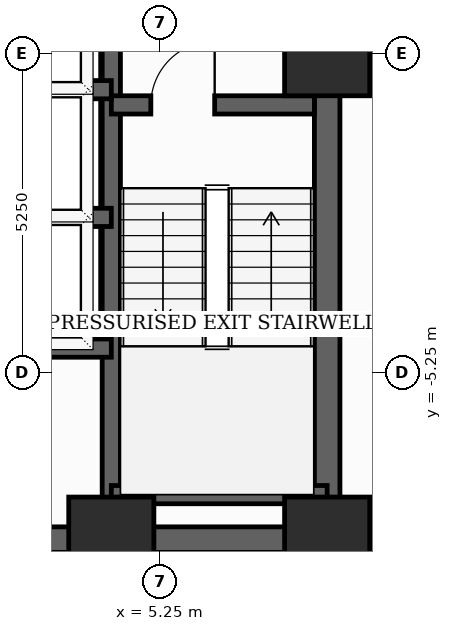
"""IFC4 building model, lengths in metres.
Left out: names, types, materials, properties, quantities, classifications, styles, units other than length and angle.
Written with IfcOpenShell. Run it as: python <this file> out.ifc"""

import sys

from ifc_helpers import new_model, si_unit, direction, frame, frame_2d, origin, origin_2d, place, context, subcontext, project, spatial, rectangle, extrude, element, fill, save


model = new_model("IFC4")
c1 = context("Model", 3, precision=1e-05, world=origin(), true_north=direction((0.0, 1.0)))
c2 = subcontext(c1, "Body", "Model", "MODEL_VIEW")
j1 = project(units=[si_unit("LENGTHUNIT", "METRE"), si_unit("PLANEANGLEUNIT", "RADIAN")], contexts=[c1])
p1 = place(None, origin())
s1 = spatial("IfcSite", under=j1, at=p1, CompositionType="ELEMENT")
p2 = place(p1, origin())
s2 = spatial("IfcBuilding", under=s1, at=p2, CompositionType="ELEMENT")
p3 = place(p2, frame((0.0, 0.0, 131.0)))
s3 = spatial("IfcBuildingStorey", under=s2, at=p3, CompositionType="ELEMENT", Elevation=131.0)
for number, where, z_axis, x_axis in (
    (1, (4.45, -8.0, 0.0), (0.0, 0.0, 1.0), (1.0, 0.0, 0.0)),
    (2, (8.0, -8.0, 0.0), (0.0, 0.0, 1.0), (1.0, 0.0, 0.0)),
    (3, (8.0, 0.0, 0.0), (0.0, 0.0, 1.0), (1.0, 0.0, 0.0)),
):
    element("IfcColumn", number, at=place(p3, frame(where, z_axis=z_axis, x_axis=x_axis)), inside=s3, PredefinedType="COLUMN", context=c2, shape_type="SweptSolid", body=[
        extrude(rectangle(XDim=1.4, YDim=1.4, at=origin_2d()), origin(), (0.0, 0.0, 1.0), 3.7),
    ])
p4 = place(p3, frame((8.0, -8.0, 0.0), z_axis=(0.0, 0.0, 1.0), x_axis=(0.0, 1.0, 0.0)))
e4 = element("IfcWall", 4, at=p4, inside=s3, PredefinedType="SHEAR", context=c2, shape_type="SweptSolid", body=[
    extrude(rectangle(XDim=16.0, YDim=0.42, at=frame_2d((8.0, 0.0))), origin(), (0.0, 0.0, 1.0), 3.5),
])
p5 = place(p4, frame((9.6, 0.0, 0.0)))
e5 = element("IfcOpeningElement", 5, at=p5, cuts=e4, PredefinedType="OPENING", context=c2, shape_type="SweptSolid", body=[
    extrude(rectangle(XDim=1.05, YDim=2.15, at=frame_2d((0.525, 1.075))), frame((0.0, 0.22, 0.0), z_axis=(0.0, -1.0, 0.0), x_axis=(1.0, 0.0, 0.0)), (0.0, 0.0, 1.0), 0.44),
])
p6 = place(p4, frame((14.229, 0.0, 0.0)))
e6 = element("IfcOpeningElement", 6, at=p6, cuts=e4, PredefinedType="OPENING", context=c2, shape_type="SweptSolid", body=[
    extrude(rectangle(XDim=0.85, YDim=2.02, at=frame_2d((0.425, 1.01))), frame((0.0, 0.22, 0.0), z_axis=(0.0, -1.0, 0.0), x_axis=(1.0, 0.0, 0.0)), (0.0, 0.0, 1.0), 0.44),
])
p7 = place(p3, frame((-8.0, -8.0, 0.0), z_axis=(0.0, 0.0, 1.0), x_axis=(1.0, 0.0, 0.0)))
e7 = element("IfcWall", 7, at=p7, inside=s3, PredefinedType="SHEAR", context=c2, shape_type="SweptSolid", body=[
    extrude(rectangle(XDim=16.0, YDim=0.42, at=frame_2d((8.0, 0.0))), origin(), (0.0, 0.0, 1.0), 3.5),
])
p8 = place(p7, frame((5.2, 0.0, 0.0)))
e8 = element("IfcOpeningElement", 8, at=p8, cuts=e7, PredefinedType="OPENING", context=c2, shape_type="SweptSolid", body=[
    extrude(rectangle(XDim=0.95, YDim=2.1, at=frame_2d((0.475, 1.05))), frame((0.0, 0.22, 0.0), z_axis=(0.0, -1.0, 0.0), x_axis=(1.0, 0.0, 0.0)), (0.0, 0.0, 1.0), 0.44),
])
p9 = place(p7, frame((9.8, 0.0, 0.0)))
e9 = element("IfcOpeningElement", 9, at=p9, cuts=e7, PredefinedType="OPENING", context=c2, shape_type="SweptSolid", body=[
    extrude(rectangle(XDim=0.95, YDim=2.1, at=frame_2d((0.475, 1.05))), frame((0.0, 0.22, 0.0), z_axis=(0.0, -1.0, 0.0), x_axis=(1.0, 0.0, 0.0)), (0.0, 0.0, 1.0), 0.44),
])
p10 = place(p3, frame((4.45, -7.79, 0.0), z_axis=(0.0, 0.0, 1.0), x_axis=(0.0, 1.0, 0.0)))
e10 = element("IfcWall", 10, at=p10, inside=s3, PredefinedType="SHEAR", context=c2, shape_type="SweptSolid", body=[
    extrude(rectangle(XDim=15.58, YDim=0.3, at=frame_2d((7.79, 0.0))), origin(), (0.0, 0.0, 1.0), 3.5),
])
p11 = place(p3, frame((4.45, -0.85, 0.0), z_axis=(0.0, 0.0, 1.0), x_axis=(1.0, 0.0, 0.0)))
e11 = element("IfcWall", 11, at=p11, inside=s3, PredefinedType="SHEAR", context=c2, shape_type="SweptSolid", body=[
    extrude(rectangle(XDim=3.34, YDim=0.3, at=frame_2d((1.67, 0.0))), origin(), (0.0, 0.0, 1.0), 3.5),
])
p12 = place(p11, frame((0.65, 0.0, 0.0)))
e12 = element("IfcOpeningElement", 12, at=p12, cuts=e11, PredefinedType="OPENING", context=c2, shape_type="SweptSolid", body=[
    extrude(rectangle(XDim=1.05, YDim=2.15, at=frame_2d((0.525, 1.075))), frame((0.0, 0.16, 0.0), z_axis=(0.0, -1.0, 0.0), x_axis=(1.0, 0.0, 0.0)), (0.0, 0.0, 1.0), 0.32),
])
p13 = place(p3, frame((4.45, -7.26, 0.0), z_axis=(0.0, 0.0, 1.0), x_axis=(1.0, 0.0, 0.0)))
e13 = element("IfcWall", 13, at=p13, inside=s3, PredefinedType="SHEAR", context=c2, shape_type="SweptSolid", body=[
    extrude(rectangle(XDim=3.55, YDim=0.3, at=frame_2d((1.775, 0.0))), origin(), (0.0, 0.0, 1.0), 3.5),
])
p14 = place(p3, frame((-4.45, -4.85, 0.0), z_axis=(0.0, 0.0, 1.0), x_axis=(1.0, 0.0, 0.0)))
e14 = element("IfcWall", 14, at=p14, inside=s3, PredefinedType="SHEAR", context=c2, shape_type="SweptSolid", body=[
    extrude(rectangle(XDim=8.9, YDim=0.3, at=frame_2d((4.45, 0.0))), origin(), (0.0, 0.0, 1.0), 3.5),
])
for number, where, z_axis, x_axis in (
    (15, (1.68, -2.7, 0.0), (0.0, 0.0, 1.0), (1.0, 0.0, 0.0)),
    (16, (1.68, -0.6, 0.0), (0.0, 0.0, 1.0), (1.0, 0.0, 0.0)),
):
    element("IfcWall", number, at=place(p3, frame(where, z_axis=z_axis, x_axis=x_axis)), inside=s3, PredefinedType="SHEAR", context=c2, shape_type="SweptSolid", body=[
        extrude(rectangle(XDim=2.77, YDim=0.3, at=frame_2d((1.385, 0.0))), origin(), (0.0, 0.0, 1.0), 3.5),
    ])
p15 = place(p12, origin())
e17 = element("IfcDoor", 17, at=p15, inside=s3, OperationType="SINGLE_SWING_RIGHT", PredefinedType="DOOR", context=c2, shape_type="SweptSolid", body=[
    extrude(rectangle(XDim=1.05, YDim=2.15, at=frame_2d((0.525, 1.075))), frame((0.0, 0.025, 0.0), z_axis=(0.0, -1.0, 0.0), x_axis=(1.0, 0.0, 0.0)), (0.0, 0.0, 1.0), 0.05),
])
fill(e12, e17)
save(model, sys.argv[1])
